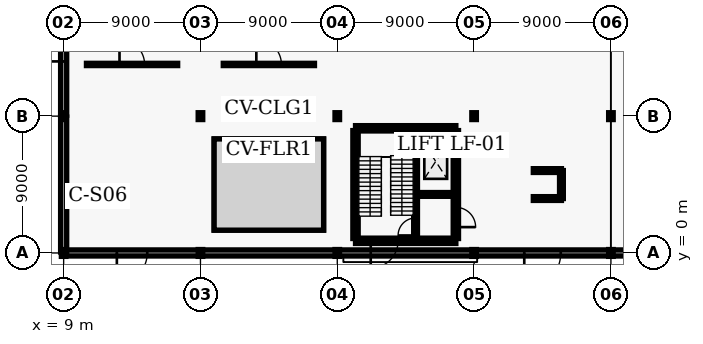
"""IFC4 building model, lengths in metres.
Left out: names, types, materials, properties, quantities, classifications, styles, units other than length and angle.
Written with IfcOpenShell. Run it as: python <this file> out.ifc"""

import sys

from ifc_helpers import new_model, si_unit, direction, frame, frame_2d, origin, origin_2d, place, context, subcontext, project, spatial, rectangle, i_section, extrude, element, fill, save


model = new_model("IFC4")
c1 = context("Model", 3, precision=1e-05, world=origin(), true_north=direction((0.0, 1.0)))
c2 = subcontext(c1, "Body", "Model", "MODEL_VIEW")
j1 = project(units=[si_unit("LENGTHUNIT", "METRE"), si_unit("PLANEANGLEUNIT", "RADIAN")], contexts=[c1])
p1 = place(None, origin())
s1 = spatial("IfcSite", under=j1, at=p1, CompositionType="ELEMENT")
p2 = place(p1, origin())
s2 = spatial("IfcBuilding", under=s1, at=p2, CompositionType="ELEMENT")
p3 = place(p2, origin())
s3 = spatial("IfcBuildingStorey", under=s2, at=p3, CompositionType="ELEMENT", Elevation=0.0)
for number, where, z_axis, x_axis in (
    (1, (9.0, 0.0, 0.0), (0.0, 0.0, 1.0), (1.0, 0.0, 0.0)),
    (2, (9.0, 9.0, 0.0), (0.0, 0.0, 1.0), (1.0, 0.0, 0.0)),
    (3, (18.0, 0.0, 0.0), (0.0, 0.0, 1.0), (1.0, 0.0, 0.0)),
    (4, (18.0, 9.0, 0.0), (0.0, 0.0, 1.0), (1.0, 0.0, 0.0)),
    (5, (27.0, 0.0, 0.0), (0.0, 0.0, 1.0), (1.0, 0.0, 0.0)),
    (6, (27.0, 9.0, 0.0), (0.0, 0.0, 1.0), (1.0, 0.0, 0.0)),
    (7, (36.0, 0.0, 0.0), (0.0, 0.0, 1.0), (1.0, 0.0, 0.0)),
    (8, (36.0, 9.0, 0.0), (0.0, 0.0, 1.0), (1.0, 0.0, 0.0)),
    (9, (45.0, 0.0, 0.0), (0.0, 0.0, 1.0), (1.0, 0.0, 0.0)),
    (10, (45.0, 9.0, 0.0), (0.0, 0.0, 1.0), (1.0, 0.0, 0.0)),
):
    element("IfcColumn", number, at=place(p3, frame(where, z_axis=z_axis, x_axis=x_axis)), inside=s3, PredefinedType="COLUMN", context=c2, shape_type="SweptSolid", body=[
        extrude(i_section(OverallWidth=0.3, OverallDepth=0.45, WebThickness=0.014, FlangeThickness=0.026, FilletRadius=0.027, at=origin_2d()), origin(), (0.0, 0.0, 1.0), 5.4),
    ])
p4 = place(p3, frame((9.06, 0.0, 0.0), z_axis=(0.0, 0.0, 1.0), x_axis=(1.0, 0.0, 0.0)))
e11 = element("IfcWall", 11, at=p4, inside=s3, PredefinedType="SOLIDWALL", context=c2, shape_type="SweptSolid", body=[
    extrude(rectangle(XDim=8.88, YDim=0.4, at=frame_2d((4.44, 0.0))), origin(), (0.0, 0.0, 1.0), 4.7),
])
p5 = place(p4, frame((3.44, 0.0, 0.0)))
e12 = element("IfcOpeningElement", 12, at=p5, cuts=e11, PredefinedType="OPENING", context=c2, shape_type="SweptSolid", body=[
    extrude(rectangle(XDim=2.0, YDim=2.3, at=frame_2d((1.0, 1.15))), frame((0.0, 0.21, 0.0), z_axis=(0.0, -1.0, 0.0), x_axis=(1.0, 0.0, 0.0)), (0.0, 0.0, 1.0), 0.42),
])
for number, where, z_axis, x_axis in (
    (13, (18.06, 0.0, 0.0), (0.0, 0.0, 1.0), (1.0, 0.0, 0.0)),
    (14, (27.06, 0.0, 0.0), (0.0, 0.0, 1.0), (1.0, 0.0, 0.0)),
):
    element("IfcWall", number, at=place(p3, frame(where, z_axis=z_axis, x_axis=x_axis)), inside=s3, PredefinedType="SOLIDWALL", context=c2, shape_type="SweptSolid", body=[
        extrude(rectangle(XDim=8.88, YDim=0.4, at=frame_2d((4.44, 0.0))), origin(), (0.0, 0.0, 1.0), 4.7),
    ])
p6 = place(p3, frame((36.06, 0.0, 0.0), z_axis=(0.0, 0.0, 1.0), x_axis=(1.0, 0.0, 0.0)))
e15 = element("IfcWall", 15, at=p6, inside=s3, PredefinedType="SOLIDWALL", context=c2, shape_type="SweptSolid", body=[
    extrude(rectangle(XDim=8.88, YDim=0.4, at=frame_2d((4.44, 0.0))), origin(), (0.0, 0.0, 1.0), 4.7),
])
p7 = place(p6, frame((3.24, 0.0, 0.0)))
e16 = element("IfcOpeningElement", 16, at=p7, cuts=e15, PredefinedType="OPENING", context=c2, shape_type="SweptSolid", body=[
    extrude(rectangle(XDim=2.4, YDim=2.5, at=frame_2d((1.2, 1.25))), frame((0.0, 0.21, 0.0), z_axis=(0.0, -1.0, 0.0), x_axis=(1.0, 0.0, 0.0)), (0.0, 0.0, 1.0), 0.42),
])
for number, where, z_axis, x_axis in (
    (17, (45.06, 0.0, 0.0), (0.0, 0.0, 1.0), (1.0, 0.0, 0.0)),
    (18, (9.0, 0.06, 0.0), (0.0, 0.0, 1.0), (0.0, 1.0, 0.0)),
):
    element("IfcWall", number, at=place(p3, frame(where, z_axis=z_axis, x_axis=x_axis)), inside=s3, PredefinedType="SOLIDWALL", context=c2, shape_type="SweptSolid", body=[
        extrude(rectangle(XDim=8.88, YDim=0.4, at=frame_2d((4.44, 0.0))), origin(), (0.0, 0.0, 1.0), 4.7),
    ])
p8 = place(p3, frame((9.0, 9.06, 0.0), z_axis=(0.0, 0.0, 1.0), x_axis=(0.0, 1.0, 0.0)))
e19 = element("IfcWall", 19, at=p8, inside=s3, PredefinedType="SOLIDWALL", context=c2, shape_type="SweptSolid", body=[
    extrude(rectangle(XDim=8.88, YDim=0.4, at=frame_2d((4.44, 0.0))), origin(), (0.0, 0.0, 1.0), 4.7),
])
p9 = place(p8, frame((3.54, 0.0, 0.0)))
e20 = element("IfcOpeningElement", 20, at=p9, cuts=e19, PredefinedType="OPENING", context=c2, shape_type="SweptSolid", body=[
    extrude(rectangle(XDim=1.8, YDim=2.2, at=frame_2d((0.9, 1.1))), frame((0.0, 0.21, 0.0), z_axis=(0.0, -1.0, 0.0), x_axis=(1.0, 0.0, 0.0)), (0.0, 0.0, 1.0), 0.42),
])
p10 = place(p3, frame((28.2, 0.8, 0.0), z_axis=(0.0, 0.0, 1.0), x_axis=(1.0, 0.0, 0.0)))
e21 = element("IfcWall", 21, at=p10, inside=s3, PredefinedType="SHEAR", context=c2, shape_type="SweptSolid", body=[
    extrude(rectangle(XDim=6.6, YDim=0.35, at=frame_2d((3.3, 0.0))), origin(), (0.0, 0.0, 1.0), 5.4),
])
p11 = place(p10, frame((1.0, 0.0, 0.0)))
e22 = element("IfcOpeningElement", 22, at=p11, cuts=e21, PredefinedType="OPENING", context=c2, shape_type="SweptSolid", body=[
    extrude(rectangle(XDim=1.8, YDim=2.15, at=frame_2d((0.9, 1.075))), frame((0.0, 0.185, 0.0), z_axis=(0.0, -1.0, 0.0), x_axis=(1.0, 0.0, 0.0)), (0.0, 0.0, 1.0), 0.37),
])
p12 = place(p3, frame((28.2, 8.2, 0.0), z_axis=(0.0, 0.0, 1.0), x_axis=(1.0, 0.0, 0.0)))
e23 = element("IfcWall", 23, at=p12, inside=s3, PredefinedType="SHEAR", context=c2, shape_type="SweptSolid", body=[
    extrude(rectangle(XDim=6.6, YDim=0.35, at=frame_2d((3.3, 0.0))), origin(), (0.0, 0.0, 1.0), 5.4),
])
p13 = place(p3, frame((28.2, 0.95, 0.0), z_axis=(0.0, 0.0, 1.0), x_axis=(0.0, 1.0, 0.0)))
e24 = element("IfcWall", 24, at=p13, inside=s3, PredefinedType="SHEAR", context=c2, shape_type="SweptSolid", body=[
    extrude(rectangle(XDim=7.1, YDim=0.35, at=frame_2d((3.55, 0.0))), origin(), (0.0, 0.0, 1.0), 5.4),
])
p14 = place(p3, frame((34.8, 0.95, 0.0), z_axis=(0.0, 0.0, 1.0), x_axis=(0.0, 1.0, 0.0)))
e25 = element("IfcWall", 25, at=p14, inside=s3, PredefinedType="SHEAR", context=c2, shape_type="SweptSolid", body=[
    extrude(rectangle(XDim=7.1, YDim=0.35, at=frame_2d((3.55, 0.0))), origin(), (0.0, 0.0, 1.0), 5.4),
])
p15 = place(p14, frame((0.75, 0.0, 0.0)))
e26 = element("IfcOpeningElement", 26, at=p15, cuts=e25, PredefinedType="OPENING", context=c2, shape_type="SweptSolid", body=[
    extrude(rectangle(XDim=1.3, YDim=2.15, at=frame_2d((0.65, 1.075))), frame((0.0, 0.185, 0.0), z_axis=(0.0, -1.0, 0.0), x_axis=(1.0, 0.0, 0.0)), (0.0, 0.0, 1.0), 0.37),
])
p16 = place(p3, frame((32.15, 0.95, 0.0), z_axis=(0.0, 0.0, 1.0), x_axis=(0.0, 1.0, 0.0)))
e27 = element("IfcWall", 27, at=p16, inside=s3, PredefinedType="SHEAR", context=c2, shape_type="SweptSolid", body=[
    extrude(rectangle(XDim=7.1, YDim=0.25, at=frame_2d((3.55, 0.0))), origin(), (0.0, 0.0, 1.0), 5.4),
])
p17 = place(p16, frame((0.2, 0.0, 0.0)))
e28 = element("IfcOpeningElement", 28, at=p17, cuts=e27, PredefinedType="OPENING", context=c2, shape_type="SweptSolid", body=[
    extrude(rectangle(XDim=1.15, YDim=2.15, at=frame_2d((0.575, 1.075))), frame((0.0, 0.135, 0.0), z_axis=(0.0, -1.0, 0.0), x_axis=(1.0, 0.0, 0.0)), (0.0, 0.0, 1.0), 0.27),
])
p18 = place(p3, frame((32.27, 3.85, 0.0), z_axis=(0.0, 0.0, 1.0), x_axis=(1.0, 0.0, 0.0)))
e29 = element("IfcWall", 29, at=p18, inside=s3, PredefinedType="SHEAR", context=c2, shape_type="SweptSolid", body=[
    extrude(rectangle(XDim=2.38, YDim=0.25, at=frame_2d((1.19, 0.0))), origin(), (0.0, 0.0, 1.0), 5.4),
])
p19 = place(p18, frame((0.64, 0.0, 0.0)))
e30 = element("IfcOpeningElement", 30, at=p19, cuts=e29, PredefinedType="OPENING", context=c2, shape_type="SweptSolid", body=[
    extrude(rectangle(XDim=1.1, YDim=2.15, at=frame_2d((0.55, 1.075))), frame((0.0, 0.135, 0.0), z_axis=(0.0, -1.0, 0.0), x_axis=(1.0, 0.0, 0.0)), (0.0, 0.0, 1.0), 0.27),
])
for number, where, z_axis, x_axis in (
    (31, (39.895, 3.58, 0.0), (0.0, 0.0, 1.0), (1.0, 0.0, 0.0)),
    (32, (39.895, 5.42, 0.0), (0.0, 0.0, 1.0), (1.0, 0.0, 0.0)),
):
    element("IfcWall", number, at=place(p3, frame(where, z_axis=z_axis, x_axis=x_axis)), inside=s3, PredefinedType="SHEAR", context=c2, shape_type="SweptSolid", body=[
        extrude(rectangle(XDim=1.85, YDim=0.25, at=frame_2d((0.925, 0.0))), origin(), (0.0, 0.0, 1.0), 5.4),
    ])
p20 = place(p3, frame((41.745, 3.58, 0.0), z_axis=(0.0, 0.0, 1.0), x_axis=(0.0, 1.0, 0.0)))
e33 = element("IfcWall", 33, at=p20, inside=s3, PredefinedType="SHEAR", context=c2, shape_type="SweptSolid", body=[
    extrude(rectangle(XDim=1.84, YDim=0.25, at=frame_2d((0.92, 0.0))), origin(), (0.0, 0.0, 1.0), 5.4),
])
p21 = place(p3, frame((10.5, 12.4, 0.0), z_axis=(0.0, 0.0, 1.0), x_axis=(1.0, 0.0, 0.0)))
e34 = element("IfcWall", 34, at=p21, inside=s3, PredefinedType="PARTITIONING", context=c2, shape_type="SweptSolid", body=[
    extrude(rectangle(XDim=6.0, YDim=0.15, at=frame_2d((3.0, 0.0))), origin(), (0.0, 0.0, 1.0), 4.3),
])
p22 = place(p21, frame((2.175, 0.0, 0.0)))
e35 = element("IfcOpeningElement", 35, at=p22, cuts=e34, PredefinedType="OPENING", context=c2, shape_type="SweptSolid", body=[
    extrude(rectangle(XDim=1.65, YDim=2.25, at=frame_2d((0.825, 1.125))), frame((0.0, 0.085, 0.0), z_axis=(0.0, -1.0, 0.0), x_axis=(1.0, 0.0, 0.0)), (0.0, 0.0, 1.0), 0.17),
])
p23 = place(p3, frame((19.5, 12.4, 0.0), z_axis=(0.0, 0.0, 1.0), x_axis=(1.0, 0.0, 0.0)))
e36 = element("IfcWall", 36, at=p23, inside=s3, PredefinedType="PARTITIONING", context=c2, shape_type="SweptSolid", body=[
    extrude(rectangle(XDim=6.0, YDim=0.15, at=frame_2d((3.0, 0.0))), origin(), (0.0, 0.0, 1.0), 4.3),
])
p24 = place(p23, frame((2.175, 0.0, 0.0)))
e37 = element("IfcOpeningElement", 37, at=p24, cuts=e36, PredefinedType="OPENING", context=c2, shape_type="SweptSolid", body=[
    extrude(rectangle(XDim=1.65, YDim=2.25, at=frame_2d((0.825, 1.125))), frame((0.0, 0.085, 0.0), z_axis=(0.0, -1.0, 0.0), x_axis=(1.0, 0.0, 0.0)), (0.0, 0.0, 1.0), 0.17),
])
p25 = place(p5, frame((2.0, 0.0, 0.0), z_axis=(0.0, 0.0, 1.0), x_axis=(-1.0, 0.0, 0.0)))
e38 = element("IfcDoor", 38, at=p25, inside=s3, OperationType="DOUBLE_DOOR_SINGLE_SWING", PredefinedType="DOOR", context=c2, shape_type="SweptSolid", body=[
    extrude(rectangle(XDim=2.0, YDim=2.3, at=frame_2d((1.0, 1.15))), frame((0.0, 0.025, 0.0), z_axis=(0.0, -1.0, 0.0), x_axis=(1.0, 0.0, 0.0)), (0.0, 0.0, 1.0), 0.05),
])
fill(e12, e38)
p26 = place(p7, frame((2.4, 0.0, 0.0), z_axis=(0.0, 0.0, 1.0), x_axis=(-1.0, 0.0, 0.0)))
e39 = element("IfcDoor", 39, at=p26, inside=s3, OperationType="DOUBLE_DOOR_SINGLE_SWING", PredefinedType="DOOR", context=c2, shape_type="SweptSolid", body=[
    extrude(rectangle(XDim=2.4, YDim=2.5, at=frame_2d((1.2, 1.25))), frame((0.0, 0.025, 0.0), z_axis=(0.0, -1.0, 0.0), x_axis=(1.0, 0.0, 0.0)), (0.0, 0.0, 1.0), 0.05),
])
fill(e16, e39)
p27 = place(p9, origin())
e40 = element("IfcDoor", 40, at=p27, inside=s3, OperationType="DOUBLE_DOOR_SINGLE_SWING", PredefinedType="DOOR", context=c2, shape_type="SweptSolid", body=[
    extrude(rectangle(XDim=1.8, YDim=2.2, at=frame_2d((0.9, 1.1))), frame((0.0, 0.025, 0.0), z_axis=(0.0, -1.0, 0.0), x_axis=(1.0, 0.0, 0.0)), (0.0, 0.0, 1.0), 0.05),
])
fill(e20, e40)
p28 = place(p15, frame((1.3, 0.0, 0.0), z_axis=(0.0, 0.0, 1.0), x_axis=(-1.0, 0.0, 0.0)))
e41 = element("IfcDoor", 41, at=p28, inside=s3, OperationType="DOUBLE_DOOR_SINGLE_SWING", PredefinedType="DOOR", context=c2, shape_type="SweptSolid", body=[
    extrude(rectangle(XDim=1.3, YDim=2.15, at=frame_2d((0.65, 1.075))), frame((0.0, 0.025, 0.0), z_axis=(0.0, -1.0, 0.0), x_axis=(1.0, 0.0, 0.0)), (0.0, 0.0, 1.0), 0.05),
])
fill(e26, e41)
p29 = place(p17, origin())
e42 = element("IfcDoor", 42, at=p29, inside=s3, OperationType="SINGLE_SWING_LEFT", PredefinedType="DOOR", context=c2, shape_type="SweptSolid", body=[
    extrude(rectangle(XDim=1.15, YDim=2.15, at=frame_2d((0.575, 1.075))), frame((0.0, 0.025, 0.0), z_axis=(0.0, -1.0, 0.0), x_axis=(1.0, 0.0, 0.0)), (0.0, 0.0, 1.0), 0.05),
])
fill(e28, e42)
p30 = place(p11, frame((1.8, 0.0, 0.0), z_axis=(0.0, 0.0, 1.0), x_axis=(-1.0, 0.0, 0.0)))
e43 = element("IfcDoor", 43, at=p30, inside=s3, OperationType="DOUBLE_DOOR_SINGLE_SWING", PredefinedType="DOOR", context=c2, shape_type="SweptSolid", body=[
    extrude(rectangle(XDim=1.8, YDim=2.15, at=frame_2d((0.9, 1.075))), frame((0.0, 0.025, 0.0), z_axis=(0.0, -1.0, 0.0), x_axis=(1.0, 0.0, 0.0)), (0.0, 0.0, 1.0), 0.05),
])
fill(e22, e43)
p31 = place(p19, origin())
e44 = element("IfcDoor", 44, at=p31, inside=s3, OperationType="SLIDING_TO_LEFT", PredefinedType="DOOR", context=c2, shape_type="SweptSolid", body=[
    extrude(rectangle(XDim=1.1, YDim=2.15, at=frame_2d((0.55, 1.075))), frame((0.0, 0.025, 0.0), z_axis=(0.0, -1.0, 0.0), x_axis=(1.0, 0.0, 0.0)), (0.0, 0.0, 1.0), 0.05),
])
fill(e30, e44)
p32 = place(p22, origin())
e45 = element("IfcDoor", 45, at=p32, inside=s3, OperationType="DOUBLE_DOOR_SINGLE_SWING", PredefinedType="DOOR", context=c2, shape_type="SweptSolid", body=[
    extrude(rectangle(XDim=1.65, YDim=2.25, at=frame_2d((0.825, 1.125))), frame((0.0, 0.025, 0.0), z_axis=(0.0, -1.0, 0.0), x_axis=(1.0, 0.0, 0.0)), (0.0, 0.0, 1.0), 0.05),
])
fill(e35, e45)
p33 = place(p24, origin())
e46 = element("IfcDoor", 46, at=p33, inside=s3, OperationType="DOUBLE_DOOR_SINGLE_SWING", PredefinedType="DOOR", context=c2, shape_type="SweptSolid", body=[
    extrude(rectangle(XDim=1.65, YDim=2.25, at=frame_2d((0.825, 1.125))), frame((0.0, 0.025, 0.0), z_axis=(0.0, -1.0, 0.0), x_axis=(1.0, 0.0, 0.0)), (0.0, 0.0, 1.0), 0.05),
])
fill(e37, e46)
save(model, sys.argv[1])
